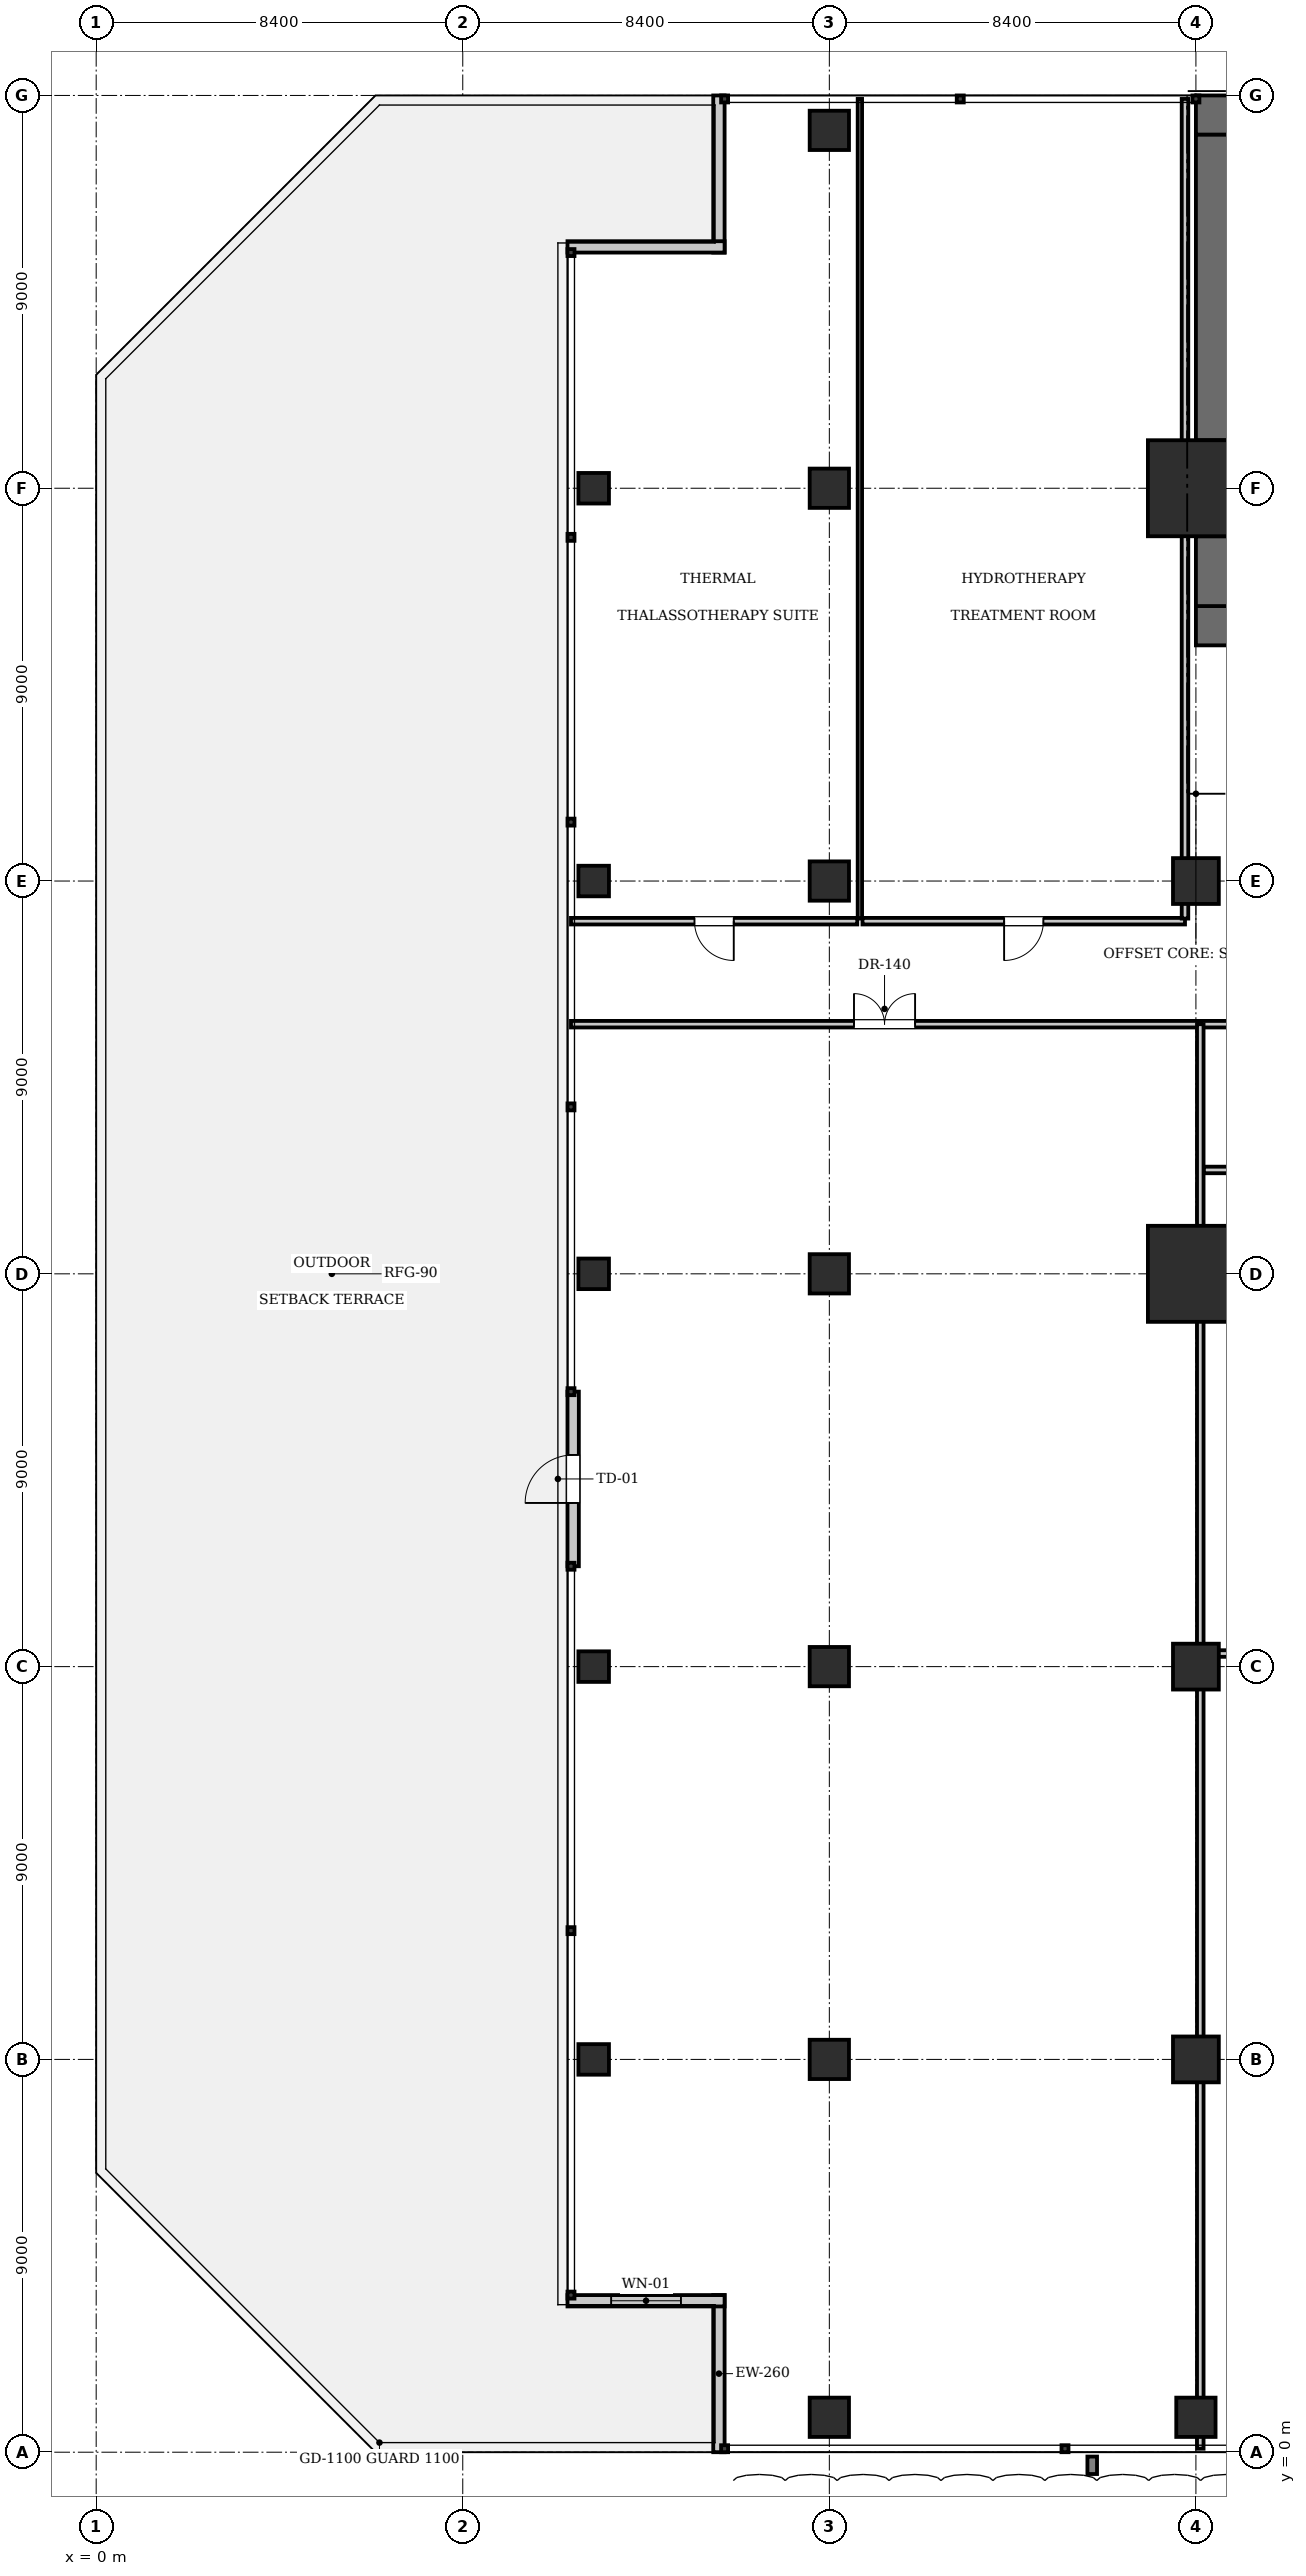
"""IFC4 building model, lengths in metres.
Left out: names, types, materials, properties, quantities, classifications, styles, units other than length and angle.
Written with IfcOpenShell. Run it as: python <this file> out.ifc"""

import sys

from ifc_helpers import new_model, si_unit, direction, frame, frame_2d, origin, origin_2d, place, context, subcontext, project, spatial, rectangle, i_section, extrude, element, fill, save


model = new_model("IFC4")
c1 = context("Model", 3, precision=1e-05, world=origin(), true_north=direction((0.0, 1.0)))
c2 = subcontext(c1, "Body", "Model", "MODEL_VIEW")
j1 = project(units=[si_unit("LENGTHUNIT", "METRE"), si_unit("PLANEANGLEUNIT", "RADIAN")], contexts=[c1])
p1 = place(None, origin())
s1 = spatial("IfcSite", under=j1, at=p1, CompositionType="ELEMENT")
p2 = place(p1, origin())
s2 = spatial("IfcBuilding", under=s1, at=p2, CompositionType="ELEMENT")
p3 = place(p2, frame((0.0, 0.0, 26.95)))
s3 = spatial("IfcBuildingStorey", under=s2, at=p3, CompositionType="ELEMENT", Elevation=26.95)
for number, where, z_axis, x_axis in (
    (1, (25.2, 27.0, 0.0), (0.0, 0.0, 1.0), (1.0, 0.0, 0.0)),
    (2, (25.2, 45.0, 0.0), (0.0, 0.0, 1.0), (1.0, 0.0, 0.0)),
):
    element("IfcColumn", number, at=place(p3, frame(where, z_axis=z_axis, x_axis=x_axis)), inside=s3, PredefinedType="COLUMN", context=c2, shape_type="SweptSolid", body=[
        extrude(rectangle(XDim=2.2, YDim=2.2, at=origin_2d()), origin(), (0.0, 0.0, 1.0), 3.85),
    ])
p4 = place(p3, frame((25.2, 53.55, 0.0), z_axis=(0.0, 0.0, 1.0), x_axis=(1.0, 0.0, 0.0)))
e3 = element("IfcWall", 3, at=p4, inside=s3, PredefinedType="SHEAR", context=c2, shape_type="SweptSolid", body=[
    extrude(rectangle(XDim=25.2, YDim=0.9, at=frame_2d((12.6, 0.0))), origin(), (0.0, 0.0, 1.0), 3.85),
])
p5 = place(p3, frame((25.2, 41.85, 0.0), z_axis=(0.0, 0.0, 1.0), x_axis=(1.0, 0.0, 0.0)))
e4 = element("IfcWall", 4, at=p5, inside=s3, PredefinedType="SHEAR", context=c2, shape_type="SweptSolid", body=[
    extrude(rectangle(XDim=6.8, YDim=0.9, at=frame_2d((3.4, 0.0))), origin(), (0.0, 0.0, 1.0), 3.85),
])
p6 = place(p5, frame((1.65, 0.0, 0.0)))
e5 = element("IfcOpeningElement", 5, at=p6, cuts=e4, PredefinedType="OPENING", context=c2, shape_type="SweptSolid", body=[
    extrude(rectangle(XDim=1.15, YDim=2.15, at=frame_2d((0.575, 1.075))), frame((0.0, 0.46, 0.0), z_axis=(0.0, -1.0, 0.0), x_axis=(1.0, 0.0, 0.0)), (0.0, 0.0, 1.0), 0.92),
])
p7 = place(p5, frame((5.15, 0.0, 0.0)))
e6 = element("IfcOpeningElement", 6, at=p7, cuts=e4, PredefinedType="OPENING", context=c2, shape_type="SweptSolid", body=[
    extrude(rectangle(XDim=1.1, YDim=2.2, at=frame_2d((0.55, 1.1))), frame((0.0, 0.46, 0.0), z_axis=(0.0, -1.0, 0.0), x_axis=(1.0, 0.0, 0.0)), (0.0, 0.0, 1.0), 0.92),
])
p8 = place(p3, frame((25.65, 42.3, 0.0), z_axis=(0.0, 0.0, 1.0), x_axis=(0.0, 1.0, 0.0)))
e7 = element("IfcWall", 7, at=p8, inside=s3, PredefinedType="SHEAR", context=c2, shape_type="SweptSolid", body=[
    extrude(rectangle(XDim=1.6, YDim=0.9, at=frame_2d((0.8, 0.0))), origin(), (0.0, 0.0, 1.0), 3.85),
])
p9 = place(p3, frame((25.65, 46.1, 0.0), z_axis=(0.0, 0.0, 1.0), x_axis=(0.0, 1.0, 0.0)))
e8 = element("IfcWall", 8, at=p9, inside=s3, PredefinedType="SHEAR", context=c2, shape_type="SweptSolid", body=[
    extrude(rectangle(XDim=7.0, YDim=0.9, at=frame_2d((3.5, 0.0))), origin(), (0.0, 0.0, 1.0), 3.85),
])
for number, where, z_axis, x_axis in (
    (9, (25.2, 36.0, 0.0), (0.0, 0.0, 1.0), (1.0, 0.0, 0.0)),
    (10, (25.2, 18.0, 0.0), (0.0, 0.0, 1.0), (1.0, 0.0, 0.0)),
    (11, (25.2, 9.0, 0.0), (0.0, 0.0, 1.0), (1.0, 0.0, 0.0)),
):
    element("IfcColumn", number, at=place(p3, frame(where, z_axis=z_axis, x_axis=x_axis)), inside=s3, PredefinedType="COLUMN", context=c2, shape_type="SweptSolid", body=[
        extrude(rectangle(XDim=1.05, YDim=1.05, at=origin_2d()), origin(), (0.0, 0.0, 1.0), 3.85),
    ])
for number, where, z_axis, x_axis in (
    (12, (16.8, 9.0, 0.0), (0.0, 0.0, 1.0), (1.0, 0.0, 0.0)),
    (13, (16.8, 18.0, 0.0), (0.0, 0.0, 1.0), (1.0, 0.0, 0.0)),
    (14, (16.8, 27.0, 0.0), (0.0, 0.0, 1.0), (1.0, 0.0, 0.0)),
    (15, (16.8, 36.0, 0.0), (0.0, 0.0, 1.0), (1.0, 0.0, 0.0)),
    (16, (16.8, 45.0, 0.0), (0.0, 0.0, 1.0), (1.0, 0.0, 0.0)),
    (17, (16.8, 0.8, 0.0), (0.0, 0.0, 1.0), (1.0, 0.0, 0.0)),
    (18, (25.2, 0.8, 0.0), (0.0, 0.0, 1.0), (1.0, 0.0, 0.0)),
    (19, (16.8, 53.2, 0.0), (0.0, 0.0, 1.0), (1.0, 0.0, 0.0)),
):
    element("IfcColumn", number, at=place(p3, frame(where, z_axis=z_axis, x_axis=x_axis)), inside=s3, PredefinedType="COLUMN", context=c2, shape_type="SweptSolid", body=[
        extrude(rectangle(XDim=0.9, YDim=0.9, at=origin_2d()), origin(), (0.0, 0.0, 1.0), 3.85),
    ])
for number, where, z_axis, x_axis in (
    (20, (11.4, 9.0, -0.24), (0.0, 0.0, 1.0), (1.0, 0.0, 0.0)),
    (21, (11.4, 18.0, -0.24), (0.0, 0.0, 1.0), (1.0, 0.0, 0.0)),
    (22, (11.4, 27.0, -0.24), (0.0, 0.0, 1.0), (1.0, 0.0, 0.0)),
    (23, (11.4, 36.0, -0.24), (0.0, 0.0, 1.0), (1.0, 0.0, 0.0)),
    (24, (11.4, 45.0, -0.24), (0.0, 0.0, 1.0), (1.0, 0.0, 0.0)),
):
    element("IfcColumn", number, at=place(p3, frame(where, z_axis=z_axis, x_axis=x_axis)), inside=s3, PredefinedType="COLUMN", context=c2, shape_type="SweptSolid", body=[
        extrude(i_section(OverallWidth=0.7, OverallDepth=0.7, WebThickness=0.028, FlangeThickness=0.044, at=origin_2d()), origin(), (0.0, 0.0, 1.0), 4.09),
    ])
p10 = place(p3, frame((14.27, 0.0, 0.0), z_axis=(0.0, 0.0, 1.0), x_axis=(0.0, 1.0, 0.0)))
e25 = element("IfcWall", 25, at=p10, inside=s3, PredefinedType="SOLIDWALL", context=c2, shape_type="SweptSolid", body=[
    extrude(rectangle(XDim=3.6, YDim=0.26, at=frame_2d((1.8, 0.0))), origin(), (0.0, 0.0, 1.0), 3.61),
])
p11 = place(p3, frame((14.4, 3.47, 0.0), z_axis=(0.0, 0.0, 1.0), x_axis=(-1.0, 0.0, 0.0)))
e26 = element("IfcWall", 26, at=p11, inside=s3, PredefinedType="SOLIDWALL", context=c2, shape_type="SweptSolid", body=[
    extrude(rectangle(XDim=3.6, YDim=0.26, at=frame_2d((1.8, 0.0))), origin(), (0.0, 0.0, 1.0), 3.61),
])
p12 = place(p11, frame((1.0, 0.0, 0.9)))
e27 = element("IfcOpeningElement", 27, at=p12, cuts=e26, PredefinedType="OPENING", context=c2, shape_type="SweptSolid", body=[
    extrude(rectangle(XDim=1.6, YDim=2.1, at=frame_2d((0.8, 1.05))), frame((0.0, 0.14, 0.0), z_axis=(0.0, -1.0, 0.0), x_axis=(1.0, 0.0, 0.0)), (0.0, 0.0, 1.0), 0.28),
])
p13 = place(p3, frame((14.27, 50.4, 0.0), z_axis=(0.0, 0.0, 1.0), x_axis=(0.0, 1.0, 0.0)))
e28 = element("IfcWall", 28, at=p13, inside=s3, PredefinedType="SOLIDWALL", context=c2, shape_type="SweptSolid", body=[
    extrude(rectangle(XDim=3.6, YDim=0.26, at=frame_2d((1.8, 0.0))), origin(), (0.0, 0.0, 1.0), 3.61),
])
p14 = place(p3, frame((10.8, 50.53, 0.0), z_axis=(0.0, 0.0, 1.0), x_axis=(1.0, 0.0, 0.0)))
e29 = element("IfcWall", 29, at=p14, inside=s3, PredefinedType="SOLIDWALL", context=c2, shape_type="SweptSolid", body=[
    extrude(rectangle(XDim=3.6, YDim=0.26, at=frame_2d((1.8, 0.0))), origin(), (0.0, 0.0, 1.0), 3.61),
])
p15 = place(p3, frame((10.93, 20.3, 0.0), z_axis=(0.0, 0.0, 1.0), x_axis=(0.0, 1.0, 0.0)))
e30 = element("IfcWall", 30, at=p15, inside=s3, PredefinedType="SOLIDWALL", context=c2, shape_type="SweptSolid", body=[
    extrude(rectangle(XDim=4.0, YDim=0.26, at=frame_2d((2.0, 0.0))), origin(), (0.0, 0.0, 1.0), 3.61),
])
p16 = place(p15, frame((1.45, 0.0, 0.0)))
e31 = element("IfcOpeningElement", 31, at=p16, cuts=e30, PredefinedType="OPENING", context=c2, shape_type="SweptSolid", body=[
    extrude(rectangle(XDim=1.1, YDim=2.2, at=frame_2d((0.55, 1.1))), frame((0.0, 0.14, 0.0), z_axis=(0.0, -1.0, 0.0), x_axis=(1.0, 0.0, 0.0)), (0.0, 0.0, 1.0), 0.28),
])
p17 = place(p3, frame((25.3, 32.72, 0.0), z_axis=(0.0, 0.0, 1.0), x_axis=(1.0, 0.0, 0.0)))
e32 = element("IfcWall", 32, at=p17, inside=s3, PredefinedType="PARTITIONING", context=c2, shape_type="SweptSolid", body=[
    extrude(rectangle(XDim=3.88, YDim=0.15, at=frame_2d((1.94, 0.0))), origin(), (0.0, 0.0, 1.0), 3.61),
])
p18 = place(p17, frame((1.2, 0.0, 0.0)))
e33 = element("IfcOpeningElement", 33, at=p18, cuts=e32, PredefinedType="OPENING", context=c2, shape_type="SweptSolid", body=[
    extrude(rectangle(XDim=0.9, YDim=2.1, at=frame_2d((0.45, 1.05))), frame((0.0, 0.085, 0.0), z_axis=(0.0, -1.0, 0.0), x_axis=(1.0, 0.0, 0.0)), (0.0, 0.0, 1.0), 0.17),
])
p19 = place(p3, frame((25.38, 29.38, 0.0), z_axis=(0.0, 0.0, 1.0), x_axis=(1.0, 0.0, 0.0)))
e34 = element("IfcWall", 34, at=p19, inside=s3, PredefinedType="PARTITIONING", context=c2, shape_type="SweptSolid", body=[
    extrude(rectangle(XDim=6.54, YDim=0.15, at=frame_2d((3.27, 0.0))), origin(), (0.0, 0.0, 1.0), 3.61),
])
p20 = place(p3, frame((25.38, 18.3, 0.0), z_axis=(0.0, 0.0, 1.0), x_axis=(1.0, 0.0, 0.0)))
e35 = element("IfcWall", 35, at=p20, inside=s3, PredefinedType="PARTITIONING", context=c2, shape_type="SweptSolid", body=[
    extrude(rectangle(XDim=24.84, YDim=0.15, at=frame_2d((12.42, 0.0))), origin(), (0.0, 0.0, 1.0), 3.61),
])
p21 = place(p20, frame((9.0, 0.0, 0.0)))
e36 = element("IfcOpeningElement", 36, at=p21, cuts=e35, PredefinedType="OPENING", context=c2, shape_type="SweptSolid", body=[
    extrude(rectangle(XDim=1.4, YDim=2.2, at=frame_2d((0.7, 1.1))), frame((0.0, 0.085, 0.0), z_axis=(0.0, -1.0, 0.0), x_axis=(1.0, 0.0, 0.0)), (0.0, 0.0, 1.0), 0.17),
])
p22 = place(p3, frame((10.88, 32.72, 0.0), z_axis=(0.0, 0.0, 1.0), x_axis=(1.0, 0.0, 0.0)))
e37 = element("IfcWall", 37, at=p22, inside=s3, PredefinedType="PARTITIONING", context=c2, shape_type="SweptSolid", body=[
    extrude(rectangle(XDim=14.37, YDim=0.15, at=frame_2d((7.185, 0.0))), origin(), (0.0, 0.0, 1.0), 3.61),
])
p23 = place(p22, frame((6.485, 0.0, 0.0)))
e38 = element("IfcOpeningElement", 38, at=p23, cuts=e37, PredefinedType="OPENING", context=c2, shape_type="SweptSolid", body=[
    extrude(rectangle(XDim=1.4, YDim=2.2, at=frame_2d((0.7, 1.1))), frame((0.0, 0.085, 0.0), z_axis=(0.0, -1.0, 0.0), x_axis=(1.0, 0.0, 0.0)), (0.0, 0.0, 1.0), 0.17),
])
p24 = place(p3, frame((25.3, 0.08, 0.0), z_axis=(0.0, 0.0, 1.0), x_axis=(0.0, 1.0, 0.0)))
e39 = element("IfcWall", 39, at=p24, inside=s3, PredefinedType="PARTITIONING", context=c2, shape_type="SweptSolid", body=[
    extrude(rectangle(XDim=32.64, YDim=0.15, at=frame_2d((16.32, 0.0))), origin(), (0.0, 0.0, 1.0), 2.975),
])
p25 = place(p3, frame((10.88, 35.08, 0.0), z_axis=(0.0, 0.0, 1.0), x_axis=(1.0, 0.0, 0.0)))
e40 = element("IfcWall", 40, at=p25, inside=s3, PredefinedType="PARTITIONING", context=c2, shape_type="SweptSolid", body=[
    extrude(rectangle(XDim=6.56, YDim=0.15, at=frame_2d((3.28, 0.0))), origin(), (0.0, 0.0, 1.0), 3.61),
])
p26 = place(p25, frame((2.83, 0.0, 0.0)))
e41 = element("IfcOpeningElement", 41, at=p26, cuts=e40, PredefinedType="OPENING", context=c2, shape_type="SweptSolid", body=[
    extrude(rectangle(XDim=0.9, YDim=2.1, at=frame_2d((0.45, 1.05))), frame((0.0, 0.085, 0.0), z_axis=(0.0, -1.0, 0.0), x_axis=(1.0, 0.0, 0.0)), (0.0, 0.0, 1.0), 0.17),
])
p27 = place(p3, frame((17.56, 35.08, 0.0), z_axis=(0.0, 0.0, 1.0), x_axis=(1.0, 0.0, 0.0)))
e42 = element("IfcWall", 42, at=p27, inside=s3, PredefinedType="PARTITIONING", context=c2, shape_type="SweptSolid", body=[
    extrude(rectangle(XDim=7.39, YDim=0.15, at=frame_2d((3.695, 0.0))), origin(), (0.0, 0.0, 1.0), 3.61),
])
p28 = place(p27, frame((3.245, 0.0, 0.0)))
e43 = element("IfcOpeningElement", 43, at=p28, cuts=e42, PredefinedType="OPENING", context=c2, shape_type="SweptSolid", body=[
    extrude(rectangle(XDim=0.9, YDim=2.1, at=frame_2d((0.45, 1.05))), frame((0.0, 0.085, 0.0), z_axis=(0.0, -1.0, 0.0), x_axis=(1.0, 0.0, 0.0)), (0.0, 0.0, 1.0), 0.17),
])
p29 = place(p3, frame((17.5, 35.14, 0.0), z_axis=(0.0, 0.0, 1.0), x_axis=(0.0, 1.0, 0.0)))
e44 = element("IfcWall", 44, at=p29, inside=s3, PredefinedType="PARTITIONING", context=c2, shape_type="SweptSolid", body=[
    extrude(rectangle(XDim=18.78, YDim=0.1, at=frame_2d((9.39, 0.0))), origin(), (0.0, 0.0, 1.0), 3.61),
])
p30 = place(p3, frame((24.95, 35.14, 0.0), z_axis=(0.0, 0.0, 1.0), x_axis=(0.0, 1.0, 0.0)))
e45 = element("IfcWall", 45, at=p30, inside=s3, PredefinedType="PARTITIONING", context=c2, shape_type="SweptSolid", body=[
    extrude(rectangle(XDim=18.78, YDim=0.15, at=frame_2d((9.39, 0.0))), origin(), (0.0, 0.0, 1.0), 3.61),
])
p31 = place(p12, origin())
e46 = element("IfcWindow", 46, at=p31, inside=s3, PartitioningType="SINGLE_PANEL", PredefinedType="WINDOW", context=c2, shape_type="SweptSolid", body=[
    extrude(rectangle(XDim=1.6, YDim=2.1, at=frame_2d((0.8, 1.05))), frame((0.0, 0.03, 0.0), z_axis=(0.0, -1.0, 0.0), x_axis=(1.0, 0.0, 0.0)), (0.0, 0.0, 1.0), 0.06),
])
fill(e27, e46)
p32 = place(p16, origin())
e47 = element("IfcDoor", 47, at=p32, inside=s3, OperationType="SINGLE_SWING_LEFT", PredefinedType="DOOR", context=c2, shape_type="SweptSolid", body=[
    extrude(rectangle(XDim=1.1, YDim=2.2, at=frame_2d((0.55, 1.1))), frame((0.0, 0.025, 0.0), z_axis=(0.0, -1.0, 0.0), x_axis=(1.0, 0.0, 0.0)), (0.0, 0.0, 1.0), 0.05),
])
fill(e31, e47)
p33 = place(p23, origin())
e48 = element("IfcDoor", 48, at=p33, inside=s3, OperationType="DOUBLE_DOOR_SINGLE_SWING", PredefinedType="DOOR", context=c2, shape_type="SweptSolid", body=[
    extrude(rectangle(XDim=1.4, YDim=2.2, at=frame_2d((0.7, 1.1))), frame((0.0, 0.025, 0.0), z_axis=(0.0, -1.0, 0.0), x_axis=(1.0, 0.0, 0.0)), (0.0, 0.0, 1.0), 0.05),
])
fill(e38, e48)
p34 = place(p26, frame((0.9, 0.0, 0.0), z_axis=(0.0, 0.0, 1.0), x_axis=(-1.0, 0.0, 0.0)))
e49 = element("IfcDoor", 49, at=p34, inside=s3, OperationType="SINGLE_SWING_LEFT", PredefinedType="DOOR", context=c2, shape_type="SweptSolid", body=[
    extrude(rectangle(XDim=0.9, YDim=2.1, at=frame_2d((0.45, 1.05))), frame((0.0, 0.025, 0.0), z_axis=(0.0, -1.0, 0.0), x_axis=(1.0, 0.0, 0.0)), (0.0, 0.0, 1.0), 0.05),
])
fill(e41, e49)
p35 = place(p28, frame((0.9, 0.0, 0.0), z_axis=(0.0, 0.0, 1.0), x_axis=(-1.0, 0.0, 0.0)))
e50 = element("IfcDoor", 50, at=p35, inside=s3, OperationType="SINGLE_SWING_RIGHT", PredefinedType="DOOR", context=c2, shape_type="SweptSolid", body=[
    extrude(rectangle(XDim=0.9, YDim=2.1, at=frame_2d((0.45, 1.05))), frame((0.0, 0.025, 0.0), z_axis=(0.0, -1.0, 0.0), x_axis=(1.0, 0.0, 0.0)), (0.0, 0.0, 1.0), 0.05),
])
fill(e43, e50)
save(model, sys.argv[1])
